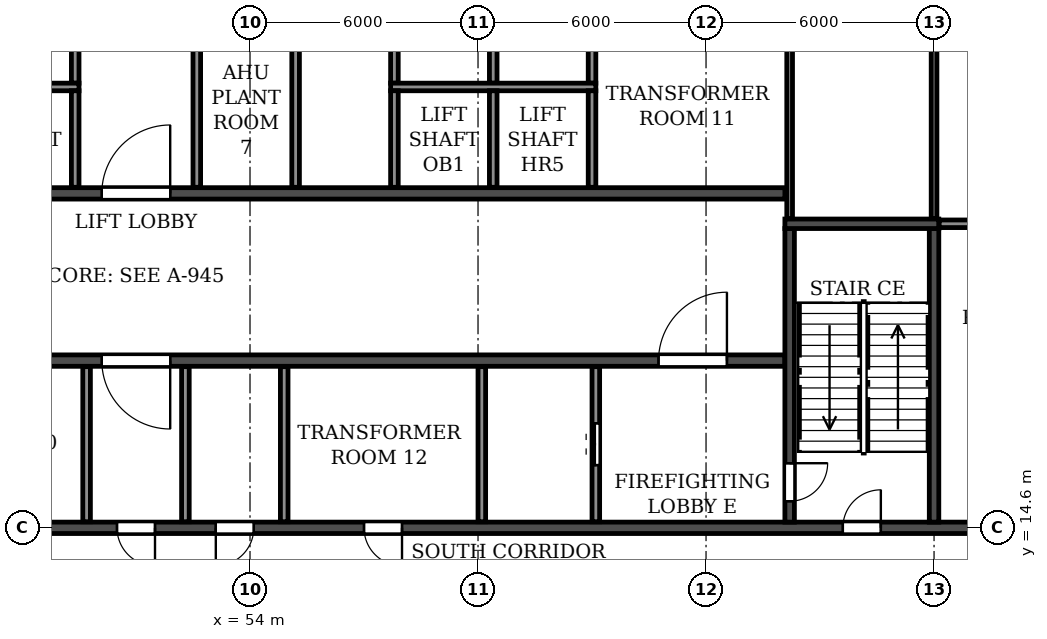
"""IFC4 building model, lengths in metres.
Left out: names, types, materials, properties, quantities, classifications, styles, units other than length and angle.
Written with IfcOpenShell. Run it as: python <this file> out.ifc"""

import sys

from ifc_helpers import new_model, si_unit, direction, frame, frame_2d, origin, place, context, subcontext, project, spatial, rectangle, extrude, element, fill, save


model = new_model("IFC4")
c1 = context("Model", 3, precision=1e-05, world=origin(), true_north=direction((0.0, 1.0)))
c2 = subcontext(c1, "Body", "Model", "MODEL_VIEW")
j1 = project(units=[si_unit("LENGTHUNIT", "METRE"), si_unit("PLANEANGLEUNIT", "RADIAN")], contexts=[c1])
p1 = place(None, origin())
s1 = spatial("IfcSite", under=j1, at=p1, CompositionType="ELEMENT")
p2 = place(p1, origin())
s2 = spatial("IfcBuilding", under=s1, at=p2, CompositionType="ELEMENT")
p3 = place(p2, frame((0.0, 0.0, 267.0)))
s3 = spatial("IfcBuildingStorey", under=s2, at=p3, CompositionType="ELEMENT", Elevation=267.0)
p4 = place(p3, frame((18.2, 14.6, 0.0), z_axis=(0.0, 0.0, 1.0), x_axis=(1.0, 0.0, 0.0)))
e1 = element("IfcWall", 1, at=p4, inside=s3, PredefinedType="SOLIDWALL", context=c2, shape_type="SweptSolid", body=[
    extrude(rectangle(XDim=65.6, YDim=0.3, at=frame_2d((32.8, 0.0))), origin(), (0.0, 0.0, 1.0), 5.15),
])
p5 = place(p4, frame((0.7, 0.0, 0.0)))
e2 = element("IfcOpeningElement", 2, at=p5, cuts=e1, PredefinedType="OPENING", context=c2, shape_type="SweptSolid", body=[
    extrude(rectangle(XDim=1.0, YDim=2.1, at=frame_2d((0.5, 1.05))), frame((0.0, 0.16, 0.0), z_axis=(0.0, -1.0, 0.0), x_axis=(1.0, 0.0, 0.0)), (0.0, 0.0, 1.0), 0.32),
])
p6 = place(p4, frame((8.35, 0.0, 0.0)))
e3 = element("IfcOpeningElement", 3, at=p6, cuts=e1, PredefinedType="OPENING", context=c2, shape_type="SweptSolid", body=[
    extrude(rectangle(XDim=1.5, YDim=2.1, at=frame_2d((0.75, 1.05))), frame((0.0, 0.16, 0.0), z_axis=(0.0, -1.0, 0.0), x_axis=(1.0, 0.0, 0.0)), (0.0, 0.0, 1.0), 0.32),
])
p7 = place(p4, frame((13.2, 0.0, 0.0)))
e4 = element("IfcOpeningElement", 4, at=p7, cuts=e1, PredefinedType="OPENING", context=c2, shape_type="SweptSolid", body=[
    extrude(rectangle(XDim=1.0, YDim=2.1, at=frame_2d((0.5, 1.05))), frame((0.0, 0.16, 0.0), z_axis=(0.0, -1.0, 0.0), x_axis=(1.0, 0.0, 0.0)), (0.0, 0.0, 1.0), 0.32),
])
p8 = place(p4, frame((27.1, 0.0, 0.0)))
e5 = element("IfcOpeningElement", 5, at=p8, cuts=e1, PredefinedType="OPENING", context=c2, shape_type="SweptSolid", body=[
    extrude(rectangle(XDim=1.0, YDim=2.1, at=frame_2d((0.5, 1.05))), frame((0.0, 0.16, 0.0), z_axis=(0.0, -1.0, 0.0), x_axis=(1.0, 0.0, 0.0)), (0.0, 0.0, 1.0), 0.32),
])
p9 = place(p4, frame((32.3, 0.0, 0.0)))
e6 = element("IfcOpeningElement", 6, at=p9, cuts=e1, PredefinedType="OPENING", context=c2, shape_type="SweptSolid", body=[
    extrude(rectangle(XDim=1.0, YDim=2.1, at=frame_2d((0.5, 1.05))), frame((0.0, 0.16, 0.0), z_axis=(0.0, -1.0, 0.0), x_axis=(1.0, 0.0, 0.0)), (0.0, 0.0, 1.0), 0.32),
])
p10 = place(p4, frame((34.9, 0.0, 0.0)))
e7 = element("IfcOpeningElement", 7, at=p10, cuts=e1, PredefinedType="OPENING", context=c2, shape_type="SweptSolid", body=[
    extrude(rectangle(XDim=1.0, YDim=2.1, at=frame_2d((0.5, 1.05))), frame((0.0, 0.16, 0.0), z_axis=(0.0, -1.0, 0.0), x_axis=(1.0, 0.0, 0.0)), (0.0, 0.0, 1.0), 0.32),
])
p11 = place(p4, frame((38.8, 0.0, 0.0)))
e8 = element("IfcOpeningElement", 8, at=p11, cuts=e1, PredefinedType="OPENING", context=c2, shape_type="SweptSolid", body=[
    extrude(rectangle(XDim=1.0, YDim=2.1, at=frame_2d((0.5, 1.05))), frame((0.0, 0.16, 0.0), z_axis=(0.0, -1.0, 0.0), x_axis=(1.0, 0.0, 0.0)), (0.0, 0.0, 1.0), 0.32),
])
p12 = place(p4, frame((51.4, 0.0, 0.0)))
e9 = element("IfcOpeningElement", 9, at=p12, cuts=e1, PredefinedType="OPENING", context=c2, shape_type="SweptSolid", body=[
    extrude(rectangle(XDim=1.0, YDim=2.1, at=frame_2d((0.5, 1.05))), frame((0.0, 0.16, 0.0), z_axis=(0.0, -1.0, 0.0), x_axis=(1.0, 0.0, 0.0)), (0.0, 0.0, 1.0), 0.32),
])
p13 = place(p4, frame((55.75, 0.0, 0.0)))
e10 = element("IfcOpeningElement", 10, at=p13, cuts=e1, PredefinedType="OPENING", context=c2, shape_type="SweptSolid", body=[
    extrude(rectangle(XDim=1.5, YDim=2.1, at=frame_2d((0.75, 1.05))), frame((0.0, 0.16, 0.0), z_axis=(0.0, -1.0, 0.0), x_axis=(1.0, 0.0, 0.0)), (0.0, 0.0, 1.0), 0.32),
])
p14 = place(p4, frame((63.9, 0.0, 0.0)))
e11 = element("IfcOpeningElement", 11, at=p14, cuts=e1, PredefinedType="OPENING", context=c2, shape_type="SweptSolid", body=[
    extrude(rectangle(XDim=1.0, YDim=2.1, at=frame_2d((0.5, 1.05))), frame((0.0, 0.16, 0.0), z_axis=(0.0, -1.0, 0.0), x_axis=(1.0, 0.0, 0.0)), (0.0, 0.0, 1.0), 0.32),
])
p15 = place(p3, frame((33.925, 19.0, 0.0), z_axis=(0.0, 0.0, 1.0), x_axis=(1.0, 0.0, 0.0)))
e12 = element("IfcWall", 12, at=p15, inside=s3, PredefinedType="SOLIDWALL", context=c2, shape_type="SweptSolid", body=[
    extrude(rectangle(XDim=34.15, YDim=0.3, at=frame_2d((17.075, 0.0))), origin(), (0.0, 0.0, 1.0), 5.15),
])
p16 = place(p15, frame((16.175, 0.0, 0.0)))
e13 = element("IfcOpeningElement", 13, at=p16, cuts=e12, PredefinedType="OPENING", context=c2, shape_type="SweptSolid", body=[
    extrude(rectangle(XDim=1.8, YDim=2.1, at=frame_2d((0.9, 1.05))), frame((0.0, 0.16, 0.0), z_axis=(0.0, -1.0, 0.0), x_axis=(1.0, 0.0, 0.0)), (0.0, 0.0, 1.0), 0.32),
])
p17 = place(p15, frame((1.525, 0.0, 0.0)))
e14 = element("IfcOpeningElement", 14, at=p17, cuts=e12, PredefinedType="OPENING", context=c2, shape_type="SweptSolid", body=[
    extrude(rectangle(XDim=1.8, YDim=2.1, at=frame_2d((0.9, 1.05))), frame((0.0, 0.16, 0.0), z_axis=(0.0, -1.0, 0.0), x_axis=(1.0, 0.0, 0.0)), (0.0, 0.0, 1.0), 0.32),
])
p18 = place(p15, frame((30.825, 0.0, 0.0)))
e15 = element("IfcOpeningElement", 15, at=p18, cuts=e12, PredefinedType="OPENING", context=c2, shape_type="SweptSolid", body=[
    extrude(rectangle(XDim=1.8, YDim=2.1, at=frame_2d((0.9, 1.05))), frame((0.0, 0.16, 0.0), z_axis=(0.0, -1.0, 0.0), x_axis=(1.0, 0.0, 0.0)), (0.0, 0.0, 1.0), 0.32),
])
p19 = place(p3, frame((33.925, 23.4, 0.0), z_axis=(0.0, 0.0, 1.0), x_axis=(1.0, 0.0, 0.0)))
e16 = element("IfcWall", 16, at=p19, inside=s3, PredefinedType="SOLIDWALL", context=c2, shape_type="SweptSolid", body=[
    extrude(rectangle(XDim=34.15, YDim=0.3, at=frame_2d((17.075, 0.0))), origin(), (0.0, 0.0, 1.0), 5.15),
])
p20 = place(p19, frame((16.175, 0.0, 0.0)))
e17 = element("IfcOpeningElement", 17, at=p20, cuts=e16, PredefinedType="OPENING", context=c2, shape_type="SweptSolid", body=[
    extrude(rectangle(XDim=1.8, YDim=2.1, at=frame_2d((0.9, 1.05))), frame((0.0, 0.16, 0.0), z_axis=(0.0, -1.0, 0.0), x_axis=(1.0, 0.0, 0.0)), (0.0, 0.0, 1.0), 0.32),
])
p21 = place(p19, frame((11.025, 0.0, 0.0)))
e18 = element("IfcOpeningElement", 18, at=p21, cuts=e16, PredefinedType="OPENING", context=c2, shape_type="SweptSolid", body=[
    extrude(rectangle(XDim=1.1, YDim=2.1, at=frame_2d((0.55, 1.05))), frame((0.0, 0.16, 0.0), z_axis=(0.0, -1.0, 0.0), x_axis=(1.0, 0.0, 0.0)), (0.0, 0.0, 1.0), 0.32),
])
p22 = place(p3, frame((68.2, 14.75, 0.0), z_axis=(0.0, 0.0, 1.0), x_axis=(0.0, 1.0, 0.0)))
e19 = element("IfcWall", 19, at=p22, inside=s3, PredefinedType="SOLIDWALL", context=c2, shape_type="SweptSolid", body=[
    extrude(rectangle(XDim=7.725, YDim=0.25, at=frame_2d((3.863, 0.0))), origin(), (0.0, 0.0, 1.0), 5.15),
])
p23 = place(p22, frame((0.55, 0.0, 0.0)))
e20 = element("IfcOpeningElement", 20, at=p23, cuts=e19, PredefinedType="OPENING", context=c2, shape_type="SweptSolid", body=[
    extrude(rectangle(XDim=1.0, YDim=2.1, at=frame_2d((0.5, 1.05))), frame((0.0, 0.135, 0.0), z_axis=(0.0, -1.0, 0.0), x_axis=(1.0, 0.0, 0.0)), (0.0, 0.0, 1.0), 0.27),
])
p24 = place(p3, frame((72.0, 14.75, 0.0), z_axis=(0.0, 0.0, 1.0), x_axis=(0.0, 1.0, 0.0)))
e21 = element("IfcWall", 21, at=p24, inside=s3, PredefinedType="SOLIDWALL", context=c2, shape_type="SweptSolid", body=[
    extrude(rectangle(XDim=7.725, YDim=0.25, at=frame_2d((3.863, 0.0))), origin(), (0.0, 0.0, 1.0), 5.15),
])
p25 = place(p3, frame((68.075, 22.6, 0.0), z_axis=(0.0, 0.0, 1.0), x_axis=(1.0, 0.0, 0.0)))
e22 = element("IfcWall", 22, at=p25, inside=s3, PredefinedType="SOLIDWALL", context=c2, shape_type="SweptSolid", body=[
    extrude(rectangle(XDim=4.05, YDim=0.25, at=frame_2d((2.025, 0.0))), origin(), (0.0, 0.0, 1.0), 5.15),
])
p26 = place(p3, frame((72.135, 22.6, 0.0), z_axis=(0.0, 0.0, 1.0), x_axis=(1.0, 0.0, 0.0)))
e23 = element("IfcWall", 23, at=p26, inside=s3, PredefinedType="PARTITIONING", context=c2, shape_type="SweptSolid", body=[
    extrude(rectangle(XDim=5.13, YDim=0.2, at=frame_2d((2.565, 0.0))), origin(), (0.0, 0.0, 1.0), 5.15),
])
p27 = place(p3, frame((49.4, 26.3, 0.0), z_axis=(0.0, 0.0, 1.0), x_axis=(0.0, 1.0, 0.0)))
e24 = element("IfcWall", 24, at=p27, inside=s3, PredefinedType="PARTITIONING", context=c2, shape_type="SweptSolid", body=[
    extrude(rectangle(XDim=1.34, YDim=0.2, at=frame_2d((0.67, 0.0))), origin(), (0.0, 0.0, 1.0), 5.15),
])
for number, where, z_axis, x_axis in (
    (25, (49.7, 14.76, 0.0), (0.0, 0.0, 1.0), (0.0, 1.0, 0.0)),
    (26, (52.3, 14.76, 0.0), (0.0, 0.0, 1.0), (0.0, 1.0, 0.0)),
):
    element("IfcWall", number, at=place(p3, frame(where, z_axis=z_axis, x_axis=x_axis)), inside=s3, PredefinedType="PARTITIONING", context=c2, shape_type="SweptSolid", body=[
        extrude(rectangle(XDim=4.08, YDim=0.2, at=frame_2d((2.04, 0.0))), origin(), (0.0, 0.0, 1.0), 5.15),
    ])
p28 = place(p3, frame((52.6, 23.56, 0.0), z_axis=(0.0, 0.0, 1.0), x_axis=(0.0, 1.0, 0.0)))
e27 = element("IfcWall", 27, at=p28, inside=s3, PredefinedType="PARTITIONING", context=c2, shape_type="SweptSolid", body=[
    extrude(rectangle(XDim=4.08, YDim=0.2, at=frame_2d((2.04, 0.0))), origin(), (0.0, 0.0, 1.0), 5.15),
])
p29 = place(p3, frame((54.9, 14.76, 0.0), z_axis=(0.0, 0.0, 1.0), x_axis=(0.0, 1.0, 0.0)))
e28 = element("IfcWall", 28, at=p29, inside=s3, PredefinedType="PARTITIONING", context=c2, shape_type="SweptSolid", body=[
    extrude(rectangle(XDim=4.08, YDim=0.2, at=frame_2d((2.04, 0.0))), origin(), (0.0, 0.0, 1.0), 5.15),
])
p30 = place(p3, frame((55.2, 23.56, 0.0), z_axis=(0.0, 0.0, 1.0), x_axis=(0.0, 1.0, 0.0)))
e29 = element("IfcWall", 29, at=p30, inside=s3, PredefinedType="PARTITIONING", context=c2, shape_type="SweptSolid", body=[
    extrude(rectangle(XDim=4.08, YDim=0.2, at=frame_2d((2.04, 0.0))), origin(), (0.0, 0.0, 1.0), 5.15),
])
for number, where, z_axis, x_axis in (
    (30, (57.8, 26.3, 0.0), (0.0, 0.0, 1.0), (0.0, 1.0, 0.0)),
    (31, (60.4, 26.3, 0.0), (0.0, 0.0, 1.0), (0.0, 1.0, 0.0)),
    (32, (63.0, 26.3, 0.0), (0.0, 0.0, 1.0), (0.0, 1.0, 0.0)),
):
    element("IfcWall", number, at=place(p3, frame(where, z_axis=z_axis, x_axis=x_axis)), inside=s3, PredefinedType="PARTITIONING", context=c2, shape_type="SweptSolid", body=[
        extrude(rectangle(XDim=1.34, YDim=0.2, at=frame_2d((0.67, 0.0))), origin(), (0.0, 0.0, 1.0), 5.15),
    ])
for number, where, z_axis, x_axis in (
    (33, (68.2, 22.735, 0.0), (0.0, 0.0, 1.0), (0.0, 1.0, 0.0)),
    (34, (72.0, 22.735, 0.0), (0.0, 0.0, 1.0), (0.0, 1.0, 0.0)),
):
    element("IfcWall", number, at=place(p3, frame(where, z_axis=z_axis, x_axis=x_axis)), inside=s3, PredefinedType="PARTITIONING", context=c2, shape_type="SweptSolid", body=[
        extrude(rectangle(XDim=4.905, YDim=0.15, at=frame_2d((2.452, 0.0))), origin(), (0.0, 0.0, 1.0), 5.15),
    ])
p31 = place(p3, frame((46.9, 26.2, 0.0), z_axis=(0.0, 0.0, 1.0), x_axis=(1.0, 0.0, 0.0)))
e35 = element("IfcWall", 35, at=p31, inside=s3, PredefinedType="PARTITIONING", context=c2, shape_type="SweptSolid", body=[
    extrude(rectangle(XDim=2.6, YDim=0.2, at=frame_2d((1.3, 0.0))), origin(), (0.0, 0.0, 1.0), 5.15),
])
p32 = place(p3, frame((57.7, 26.2, 0.0), z_axis=(0.0, 0.0, 1.0), x_axis=(1.0, 0.0, 0.0)))
e36 = element("IfcWall", 36, at=p32, inside=s3, PredefinedType="PARTITIONING", context=c2, shape_type="SweptSolid", body=[
    extrude(rectangle(XDim=5.4, YDim=0.2, at=frame_2d((2.7, 0.0))), origin(), (0.0, 0.0, 1.0), 5.15),
])
for number, where, z_axis, x_axis in (
    (37, (49.4, 23.56, 0.0), (0.0, 0.0, 1.0), (0.0, 1.0, 0.0)),
    (38, (57.8, 23.56, 0.0), (0.0, 0.0, 1.0), (0.0, 1.0, 0.0)),
):
    element("IfcWall", number, at=place(p3, frame(where, z_axis=z_axis, x_axis=x_axis)), inside=s3, PredefinedType="PARTITIONING", context=c2, shape_type="SweptSolid", body=[
        extrude(rectangle(XDim=2.54, YDim=0.2, at=frame_2d((1.27, 0.0))), origin(), (0.0, 0.0, 1.0), 5.15),
    ])
p33 = place(p3, frame((60.1, 14.76, 0.0), z_axis=(0.0, 0.0, 1.0), x_axis=(0.0, 1.0, 0.0)))
e39 = element("IfcWall", 39, at=p33, inside=s3, PredefinedType="PARTITIONING", context=c2, shape_type="SweptSolid", body=[
    extrude(rectangle(XDim=4.08, YDim=0.2, at=frame_2d((2.04, 0.0))), origin(), (0.0, 0.0, 1.0), 5.15),
])
for number, where, z_axis, x_axis in (
    (40, (60.4, 23.56, 0.0), (0.0, 0.0, 1.0), (0.0, 1.0, 0.0)),
    (41, (63.0, 23.56, 0.0), (0.0, 0.0, 1.0), (0.0, 1.0, 0.0)),
):
    element("IfcWall", number, at=place(p3, frame(where, z_axis=z_axis, x_axis=x_axis)), inside=s3, PredefinedType="PARTITIONING", context=c2, shape_type="SweptSolid", body=[
        extrude(rectangle(XDim=2.54, YDim=0.2, at=frame_2d((1.27, 0.0))), origin(), (0.0, 0.0, 1.0), 5.15),
    ])
p34 = place(p3, frame((63.1, 14.76, 0.0), z_axis=(0.0, 0.0, 1.0), x_axis=(0.0, 1.0, 0.0)))
e42 = element("IfcWall", 42, at=p34, inside=s3, PredefinedType="PARTITIONING", context=c2, shape_type="SweptSolid", body=[
    extrude(rectangle(XDim=4.08, YDim=0.2, at=frame_2d((2.04, 0.0))), origin(), (0.0, 0.0, 1.0), 5.15),
])
p35 = place(p34, frame((1.49, 0.0, 0.0)))
e43 = element("IfcOpeningElement", 43, at=p35, cuts=e42, PredefinedType="OPENING", context=c2, shape_type="SweptSolid", body=[
    extrude(rectangle(XDim=1.1, YDim=2.1, at=frame_2d((0.55, 1.05))), frame((0.0, 0.11, 0.0), z_axis=(0.0, -1.0, 0.0), x_axis=(1.0, 0.0, 0.0)), (0.0, 0.0, 1.0), 0.22),
])
p36 = place(p9, frame((1.0, 0.0, 0.0), z_axis=(0.0, 0.0, 1.0), x_axis=(-1.0, 0.0, 0.0)))
e44 = element("IfcDoor", 44, at=p36, inside=s3, OperationType="SINGLE_SWING_LEFT", PredefinedType="DOOR", context=c2, shape_type="SweptSolid", body=[
    extrude(rectangle(XDim=1.0, YDim=2.1, at=frame_2d((0.5, 1.05))), frame((0.0, 0.025, 0.0), z_axis=(0.0, -1.0, 0.0), x_axis=(1.0, 0.0, 0.0)), (0.0, 0.0, 1.0), 0.05),
])
fill(e6, e44)
p37 = place(p10, frame((1.0, 0.0, 0.0), z_axis=(0.0, 0.0, 1.0), x_axis=(-1.0, 0.0, 0.0)))
e45 = element("IfcDoor", 45, at=p37, inside=s3, OperationType="SINGLE_SWING_RIGHT", PredefinedType="DOOR", context=c2, shape_type="SweptSolid", body=[
    extrude(rectangle(XDim=1.0, YDim=2.1, at=frame_2d((0.5, 1.05))), frame((0.0, 0.025, 0.0), z_axis=(0.0, -1.0, 0.0), x_axis=(1.0, 0.0, 0.0)), (0.0, 0.0, 1.0), 0.05),
])
fill(e7, e45)
p38 = place(p11, frame((1.0, 0.0, 0.0), z_axis=(0.0, 0.0, 1.0), x_axis=(-1.0, 0.0, 0.0)))
e46 = element("IfcDoor", 46, at=p38, inside=s3, OperationType="SINGLE_SWING_LEFT", PredefinedType="DOOR", context=c2, shape_type="SweptSolid", body=[
    extrude(rectangle(XDim=1.0, YDim=2.1, at=frame_2d((0.5, 1.05))), frame((0.0, 0.025, 0.0), z_axis=(0.0, -1.0, 0.0), x_axis=(1.0, 0.0, 0.0)), (0.0, 0.0, 1.0), 0.05),
])
fill(e8, e46)
p39 = place(p12, origin())
e47 = element("IfcDoor", 47, at=p39, inside=s3, OperationType="SINGLE_SWING_RIGHT", PredefinedType="DOOR", context=c2, shape_type="SweptSolid", body=[
    extrude(rectangle(XDim=1.0, YDim=2.1, at=frame_2d((0.5, 1.05))), frame((0.0, 0.025, 0.0), z_axis=(0.0, -1.0, 0.0), x_axis=(1.0, 0.0, 0.0)), (0.0, 0.0, 1.0), 0.05),
])
fill(e9, e47)
p40 = place(p35, origin())
e48 = element("IfcDoor", 48, at=p40, inside=s3, OperationType="DOUBLE_DOOR_SLIDING", PredefinedType="DOOR", context=c2, shape_type="SweptSolid", body=[
    extrude(rectangle(XDim=1.1, YDim=2.1, at=frame_2d((0.55, 1.05))), frame((0.0, 0.025, 0.0), z_axis=(0.0, -1.0, 0.0), x_axis=(1.0, 0.0, 0.0)), (0.0, 0.0, 1.0), 0.05),
])
fill(e43, e48)
p41 = place(p23, frame((1.0, 0.0, 0.0), z_axis=(0.0, 0.0, 1.0), x_axis=(-1.0, 0.0, 0.0)))
e49 = element("IfcDoor", 49, at=p41, inside=s3, OperationType="SINGLE_SWING_LEFT", PredefinedType="DOOR", context=c2, shape_type="SweptSolid", body=[
    extrude(rectangle(XDim=1.0, YDim=2.1, at=frame_2d((0.5, 1.05))), frame((0.0, 0.025, 0.0), z_axis=(0.0, -1.0, 0.0), x_axis=(1.0, 0.0, 0.0)), (0.0, 0.0, 1.0), 0.05),
])
fill(e20, e49)
p42 = place(p20, origin())
e50 = element("IfcDoor", 50, at=p42, inside=s3, OperationType="DOUBLE_DOOR_SINGLE_SWING", PredefinedType="DOOR", context=c2, shape_type="SweptSolid", body=[
    extrude(rectangle(XDim=1.8, YDim=2.1, at=frame_2d((0.9, 1.05))), frame((0.0, 0.025, 0.0), z_axis=(0.0, -1.0, 0.0), x_axis=(1.0, 0.0, 0.0)), (0.0, 0.0, 1.0), 0.05),
])
fill(e17, e50)
p43 = place(p16, frame((1.8, 0.0, 0.0), z_axis=(0.0, 0.0, 1.0), x_axis=(-1.0, 0.0, 0.0)))
e51 = element("IfcDoor", 51, at=p43, inside=s3, OperationType="DOUBLE_DOOR_SINGLE_SWING", PredefinedType="DOOR", context=c2, shape_type="SweptSolid", body=[
    extrude(rectangle(XDim=1.8, YDim=2.1, at=frame_2d((0.9, 1.05))), frame((0.0, 0.025, 0.0), z_axis=(0.0, -1.0, 0.0), x_axis=(1.0, 0.0, 0.0)), (0.0, 0.0, 1.0), 0.05),
])
fill(e13, e51)
p44 = place(p18, origin())
e52 = element("IfcDoor", 52, at=p44, inside=s3, OperationType="DOUBLE_DOOR_SINGLE_SWING", PredefinedType="DOOR", context=c2, shape_type="SweptSolid", body=[
    extrude(rectangle(XDim=1.8, YDim=2.1, at=frame_2d((0.9, 1.05))), frame((0.0, 0.025, 0.0), z_axis=(0.0, -1.0, 0.0), x_axis=(1.0, 0.0, 0.0)), (0.0, 0.0, 1.0), 0.05),
])
fill(e15, e52)
save(model, sys.argv[1])
